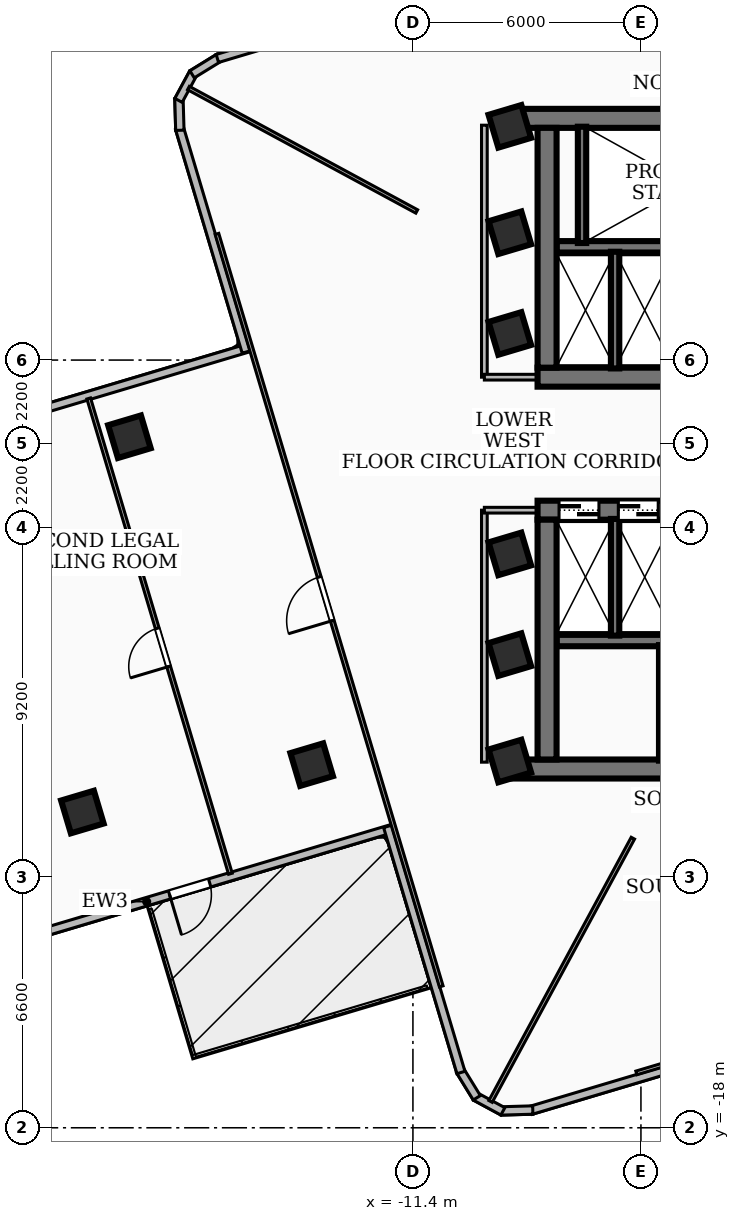
"""IFC4 building model, lengths in metres.
Left out: names, types, materials, properties, quantities, classifications, styles, units other than length and angle.
Written with IfcOpenShell. Run it as: python <this file> out.ifc"""

import sys

from ifc_helpers import new_model, si_unit, direction, frame, frame_2d, origin, origin_2d, place, context, subcontext, project, spatial, rectangle, extrude, element, fill, save


model = new_model("IFC4")
c1 = context("Model", 3, precision=1e-05, world=origin(), true_north=direction((0.0, 1.0)))
c2 = subcontext(c1, "Body", "Model", "MODEL_VIEW")
j1 = project(units=[si_unit("LENGTHUNIT", "METRE"), si_unit("PLANEANGLEUNIT", "RADIAN")], contexts=[c1])
p1 = place(None, origin())
s1 = spatial("IfcSite", under=j1, at=p1, CompositionType="ELEMENT")
p2 = place(p1, origin())
s2 = spatial("IfcBuilding", under=s1, at=p2, CompositionType="ELEMENT")
p3 = place(p2, frame((0.0, 0.0, 145.08)))
s3 = spatial("IfcBuildingStorey", under=s2, at=p3, CompositionType="ELEMENT", Elevation=145.08)
p4 = place(p3, frame((-8.78, 8.56, 0.0), z_axis=(0.0, 0.0, 1.0), x_axis=(1.0, 0.0, 0.0)))
e1 = element("IfcWall", 1, at=p4, inside=s3, PredefinedType="SHEAR", context=c2, shape_type="SweptSolid", body=[
    extrude(rectangle(XDim=17.56, YDim=0.5, at=frame_2d((8.78, 0.0))), origin(), (0.0, 0.0, 1.0), 3.32),
])
p5 = place(p3, frame((8.12, 1.75, 0.0), z_axis=(0.0, 0.0, 1.0), x_axis=(-1.0, 0.0, 0.0)))
e2 = element("IfcWall", 2, at=p5, inside=s3, PredefinedType="SHEAR", context=c2, shape_type="SweptSolid", body=[
    extrude(rectangle(XDim=16.24, YDim=0.5, at=frame_2d((8.12, 0.0))), origin(), (0.0, 0.0, 1.0), 3.32),
])
p6 = place(p5, frame((7.45, 0.0, 0.0)))
e3 = element("IfcOpeningElement", 3, at=p6, cuts=e2, PredefinedType="OPENING", context=c2, shape_type="SweptSolid", body=[
    extrude(rectangle(XDim=1.0, YDim=2.1, at=frame_2d((0.5, 1.05))), frame((0.0, 0.26, 0.0), z_axis=(0.0, -1.0, 0.0), x_axis=(1.0, 0.0, 0.0)), (0.0, 0.0, 1.0), 0.52),
])
p7 = place(p5, frame((3.85, 0.0, 0.0)))
e4 = element("IfcOpeningElement", 4, at=p7, cuts=e2, PredefinedType="OPENING", context=c2, shape_type="SweptSolid", body=[
    extrude(rectangle(XDim=0.9, YDim=2.06, at=frame_2d((0.45, 1.03))), frame((0.0, 0.26, 0.0), z_axis=(0.0, -1.0, 0.0), x_axis=(1.0, 0.0, 0.0)), (0.0, 0.0, 1.0), 0.52),
])
p8 = place(p5, frame((2.35, 0.0, 0.0)))
e5 = element("IfcOpeningElement", 5, at=p8, cuts=e2, PredefinedType="OPENING", context=c2, shape_type="SweptSolid", body=[
    extrude(rectangle(XDim=0.9, YDim=2.06, at=frame_2d((0.45, 1.03))), frame((0.0, 0.26, 0.0), z_axis=(0.0, -1.0, 0.0), x_axis=(1.0, 0.0, 0.0)), (0.0, 0.0, 1.0), 0.52),
])
p9 = place(p5, frame((0.8, 0.0, 0.0)))
e6 = element("IfcOpeningElement", 6, at=p9, cuts=e2, PredefinedType="OPENING", context=c2, shape_type="SweptSolid", body=[
    extrude(rectangle(XDim=0.9, YDim=2.06, at=frame_2d((0.45, 1.03))), frame((0.0, 0.26, 0.0), z_axis=(0.0, -1.0, 0.0), x_axis=(1.0, 0.0, 0.0)), (0.0, 0.0, 1.0), 0.52),
])
p10 = place(p3, frame((-7.87, 2.0, 0.0), z_axis=(0.0, 0.0, 1.0), x_axis=(0.0, 1.0, 0.0)))
e7 = element("IfcWall", 7, at=p10, inside=s3, PredefinedType="SHEAR", context=c2, shape_type="SweptSolid", body=[
    extrude(rectangle(XDim=6.31, YDim=0.5, at=frame_2d((3.155, 0.0))), origin(), (0.0, 0.0, 1.0), 3.32),
])
p11 = place(p3, frame((7.62, 5.18, 0.0), z_axis=(0.0, 0.0, 1.0), x_axis=(-1.0, 0.0, 0.0)))
e8 = element("IfcWall", 8, at=p11, inside=s3, PredefinedType="SOLIDWALL", context=c2, shape_type="SweptSolid", body=[
    extrude(rectangle(XDim=15.24, YDim=0.3, at=frame_2d((7.62, 0.0))), origin(), (0.0, 0.0, 1.0), 3.32),
])
p12 = place(p11, frame((5.77, 0.0, 0.0)))
e9 = element("IfcOpeningElement", 9, at=p12, cuts=e8, PredefinedType="OPENING", context=c2, shape_type="SweptSolid", body=[
    extrude(rectangle(XDim=1.1, YDim=2.15, at=frame_2d((0.55, 1.075))), frame((0.0, 0.16, 0.0), z_axis=(0.0, -1.0, 0.0), x_axis=(1.0, 0.0, 0.0)), (0.0, 0.0, 1.0), 0.32),
])
p13 = place(p11, frame((2.97, 0.0, 0.0)))
e10 = element("IfcOpeningElement", 10, at=p13, cuts=e8, PredefinedType="OPENING", context=c2, shape_type="SweptSolid", body=[
    extrude(rectangle(XDim=1.1, YDim=2.15, at=frame_2d((0.55, 1.075))), frame((0.0, 0.16, 0.0), z_axis=(0.0, -1.0, 0.0), x_axis=(1.0, 0.0, 0.0)), (0.0, 0.0, 1.0), 0.32),
])
p14 = place(p11, frame((7.97, 0.0, 0.0)))
e11 = element("IfcOpeningElement", 11, at=p14, cuts=e8, PredefinedType="OPENING", context=c2, shape_type="SweptSolid", body=[
    extrude(rectangle(XDim=1.0, YDim=2.1, at=frame_2d((0.5, 1.05))), frame((0.0, 0.16, 0.0), z_axis=(0.0, -1.0, 0.0), x_axis=(1.0, 0.0, 0.0)), (0.0, 0.0, 1.0), 0.32),
])
p15 = place(p3, frame((8.78, -8.56, 0.0), z_axis=(0.0, 0.0, 1.0), x_axis=(-1.0, 0.0, 0.0)))
e12 = element("IfcWall", 12, at=p15, inside=s3, PredefinedType="SHEAR", context=c2, shape_type="SweptSolid", body=[
    extrude(rectangle(XDim=17.56, YDim=0.5, at=frame_2d((8.78, 0.0))), origin(), (0.0, 0.0, 1.0), 3.32),
])
p16 = place(p3, frame((-8.12, -1.75, 0.0), z_axis=(0.0, 0.0, 1.0), x_axis=(1.0, 0.0, 0.0)))
e13 = element("IfcWall", 13, at=p16, inside=s3, PredefinedType="SHEAR", context=c2, shape_type="SweptSolid", body=[
    extrude(rectangle(XDim=16.24, YDim=0.5, at=frame_2d((8.12, 0.0))), origin(), (0.0, 0.0, 1.0), 3.32),
])
p17 = place(p16, frame((7.45, 0.0, 0.0)))
e14 = element("IfcOpeningElement", 14, at=p17, cuts=e13, PredefinedType="OPENING", context=c2, shape_type="SweptSolid", body=[
    extrude(rectangle(XDim=1.0, YDim=2.1, at=frame_2d((0.5, 1.05))), frame((0.0, 0.26, 0.0), z_axis=(0.0, -1.0, 0.0), x_axis=(1.0, 0.0, 0.0)), (0.0, 0.0, 1.0), 0.52),
])
p18 = place(p16, frame((12.65, 0.0, 0.0)))
e15 = element("IfcOpeningElement", 15, at=p18, cuts=e13, PredefinedType="OPENING", context=c2, shape_type="SweptSolid", body=[
    extrude(rectangle(XDim=0.9, YDim=2.06, at=frame_2d((0.45, 1.03))), frame((0.0, 0.26, 0.0), z_axis=(0.0, -1.0, 0.0), x_axis=(1.0, 0.0, 0.0)), (0.0, 0.0, 1.0), 0.52),
])
p19 = place(p16, frame((0.565, 0.0, 0.0)))
e16 = element("IfcOpeningElement", 16, at=p19, cuts=e13, PredefinedType="OPENING", context=c2, shape_type="SweptSolid", body=[
    extrude(rectangle(XDim=1.05, YDim=2.15, at=frame_2d((0.525, 1.075))), frame((0.0, 0.26, 0.0), z_axis=(0.0, -1.0, 0.0), x_axis=(1.0, 0.0, 0.0)), (0.0, 0.0, 1.0), 0.52),
])
p20 = place(p16, frame((2.125, 0.0, 0.0)))
e17 = element("IfcOpeningElement", 17, at=p20, cuts=e13, PredefinedType="OPENING", context=c2, shape_type="SweptSolid", body=[
    extrude(rectangle(XDim=1.05, YDim=2.15, at=frame_2d((0.525, 1.075))), frame((0.0, 0.26, 0.0), z_axis=(0.0, -1.0, 0.0), x_axis=(1.0, 0.0, 0.0)), (0.0, 0.0, 1.0), 0.52),
])
p21 = place(p16, frame((3.685, 0.0, 0.0)))
e18 = element("IfcOpeningElement", 18, at=p21, cuts=e13, PredefinedType="OPENING", context=c2, shape_type="SweptSolid", body=[
    extrude(rectangle(XDim=1.05, YDim=2.15, at=frame_2d((0.525, 1.075))), frame((0.0, 0.26, 0.0), z_axis=(0.0, -1.0, 0.0), x_axis=(1.0, 0.0, 0.0)), (0.0, 0.0, 1.0), 0.52),
])
p22 = place(p3, frame((-7.87, -8.31, 0.0), z_axis=(0.0, 0.0, 1.0), x_axis=(0.0, 1.0, 0.0)))
e19 = element("IfcWall", 19, at=p22, inside=s3, PredefinedType="SHEAR", context=c2, shape_type="SweptSolid", body=[
    extrude(rectangle(XDim=6.31, YDim=0.5, at=frame_2d((3.155, 0.0))), origin(), (0.0, 0.0, 1.0), 3.32),
])
p23 = place(p3, frame((-7.62, -5.18, 0.0), z_axis=(0.0, 0.0, 1.0), x_axis=(1.0, 0.0, 0.0)))
e20 = element("IfcWall", 20, at=p23, inside=s3, PredefinedType="SOLIDWALL", context=c2, shape_type="SweptSolid", body=[
    extrude(rectangle(XDim=15.24, YDim=0.3, at=frame_2d((7.62, 0.0))), origin(), (0.0, 0.0, 1.0), 3.32),
])
p24 = place(p23, frame((5.77, 0.0, 0.0)))
e21 = element("IfcOpeningElement", 21, at=p24, cuts=e20, PredefinedType="OPENING", context=c2, shape_type="SweptSolid", body=[
    extrude(rectangle(XDim=1.1, YDim=2.15, at=frame_2d((0.55, 1.075))), frame((0.0, 0.16, 0.0), z_axis=(0.0, -1.0, 0.0), x_axis=(1.0, 0.0, 0.0)), (0.0, 0.0, 1.0), 0.32),
])
p25 = place(p23, frame((7.97, 0.0, 0.0)))
e22 = element("IfcOpeningElement", 22, at=p25, cuts=e20, PredefinedType="OPENING", context=c2, shape_type="SweptSolid", body=[
    extrude(rectangle(XDim=1.0, YDim=2.1, at=frame_2d((0.5, 1.05))), frame((0.0, 0.16, 0.0), z_axis=(0.0, -1.0, 0.0), x_axis=(1.0, 0.0, 0.0)), (0.0, 0.0, 1.0), 0.32),
])
p26 = place(p3, frame((-6.95, 5.28, 0.0), z_axis=(0.0, 0.0, 1.0), x_axis=(0.0, 1.0, 0.0)))
e23 = element("IfcWall", 23, at=p26, inside=s3, PredefinedType="SOLIDWALL", context=c2, shape_type="SweptSolid", body=[
    extrude(rectangle(XDim=3.06, YDim=0.22, at=frame_2d((1.53, 0.0))), origin(), (0.0, 0.0, 1.0), 3.32),
])
p27 = place(p3, frame((-4.8, -8.34, 0.0), z_axis=(0.0, 0.0, 1.0), x_axis=(0.0, 1.0, 0.0)))
e24 = element("IfcWall", 24, at=p27, inside=s3, PredefinedType="SOLIDWALL", context=c2, shape_type="SweptSolid", body=[
    extrude(rectangle(XDim=3.04, YDim=0.25, at=frame_2d((1.52, 0.0))), origin(), (0.0, 0.0, 1.0), 3.32),
])
for number, where, z_axis, x_axis in (
    (25, (-6.08, 1.98, 0.0), (0.0, 0.0, 1.0), (0.0, 1.0, 0.0)),
    (26, (-6.08, -5.05, 0.0), (0.0, 0.0, 1.0), (0.0, 1.0, 0.0)),
):
    element("IfcWall", number, at=place(p3, frame(where, z_axis=z_axis, x_axis=x_axis)), inside=s3, PredefinedType="SOLIDWALL", context=c2, shape_type="SweptSolid", body=[
        extrude(rectangle(XDim=3.07, YDim=0.22, at=frame_2d((1.535, 0.0))), origin(), (0.0, 0.0, 1.0), 3.32),
    ])
for number, where, z_axis, x_axis in (
    (27, (-8.85, -5.55, 0.0), (0.0, 0.0, 1.0), (0.958, 0.286, 0.0)),
    (28, (-8.85, -2.9, 0.0), (0.0, 0.0, 1.0), (0.958, 0.286, 0.0)),
    (29, (-8.85, 2.9, 0.0), (0.0, 0.0, 1.0), (0.958, 0.286, 0.0)),
    (30, (-8.85, 5.55, 0.0), (0.0, 0.0, 1.0), (0.958, 0.286, 0.0)),
    (31, (-8.85, 8.35, 0.0), (0.0, 0.0, 1.0), (0.958, 0.286, 0.0)),
    (32, (-8.85, -8.35, 0.0), (0.0, 0.0, 1.0), (0.958, 0.286, 0.0)),
    (33, (-18.86, 0.183, 0.0), (0.0, 0.0, 1.0), (0.958, 0.286, 0.0)),
    (34, (-14.064, -8.445, 0.0), (0.0, 0.0, 1.0), (0.958, 0.286, 0.0)),
    (35, (-20.098, -9.692, 0.0), (0.0, 0.0, 1.0), (0.958, 0.286, 0.0)),
):
    element("IfcColumn", number, at=place(p3, frame(where, z_axis=z_axis, x_axis=x_axis)), inside=s3, PredefinedType="COLUMN", context=c2, shape_type="SweptSolid", body=[
        extrude(rectangle(XDim=0.9, YDim=0.9, at=origin_2d()), origin(), (0.0, 0.0, 1.0), 3.6),
    ])
p28 = place(p3, frame((-11.957, -10.129, 0.0), z_axis=(0.0, 0.0, 1.0), x_axis=(-0.958343962332, -0.285616613419, 0.0)))
e36 = element("IfcWall", 36, at=p28, inside=s3, PredefinedType="SOLIDWALL", context=c2, shape_type="SweptSolid", body=[
    extrude(rectangle(XDim=13.458, YDim=0.22, at=frame_2d((6.729, 0.0))), origin(), (0.0, 0.0, 1.0), 3.32),
])
p29 = place(p28, frame((5.0, 0.0, 0.0)))
e37 = element("IfcOpeningElement", 37, at=p29, cuts=e36, PredefinedType="OPENING", context=c2, shape_type="SweptSolid", body=[
    extrude(rectangle(XDim=1.1, YDim=2.1, at=frame_2d((0.55, 1.05))), frame((0.0, 0.12, 0.0), z_axis=(0.0, -1.0, 0.0), x_axis=(1.0, 0.0, 0.0)), (0.0, 0.0, 1.0), 0.24),
])
p30 = place(p3, frame((-28.626, -1.323, 0.0), z_axis=(0.0, 0.0, 1.0), x_axis=(0.958343962332, 0.285616613419, 0.0)))
e38 = element("IfcWall", 38, at=p30, inside=s3, PredefinedType="SOLIDWALL", context=c2, shape_type="SweptSolid", body=[
    extrude(rectangle(XDim=13.458, YDim=0.22, at=frame_2d((6.729, 0.0))), origin(), (0.0, 0.0, 1.0), 3.32),
])
p31 = place(p30, frame((0.85, 0.0, 0.85)))
e39 = element("IfcOpeningElement", 39, at=p31, cuts=e38, PredefinedType="OPENING", context=c2, shape_type="SweptSolid", body=[
    extrude(rectangle(XDim=2.4, YDim=1.85, at=frame_2d((1.2, 0.925))), frame((0.0, 0.12, 0.0), z_axis=(0.0, -1.0, 0.0), x_axis=(1.0, 0.0, 0.0)), (0.0, 0.0, 1.0), 0.24),
])
p32 = place(p3, frame((-15.787, 2.412, 0.0), z_axis=(0.0, 0.0, 1.0), x_axis=(-0.285712854037, 0.958315274342, 0.0)))
e40 = element("IfcWall", 40, at=p32, inside=s3, PredefinedType="SOLIDWALL", context=c2, shape_type="SweptSolid", body=[
    extrude(rectangle(XDim=6.139, YDim=0.22, at=frame_2d((3.069, 0.0))), origin(), (0.0, 0.0, 1.0), 3.32),
])
p33 = place(p3, frame((-17.533, 8.246, 0.0), z_axis=(0.0, 0.0, 1.0), x_axis=(-0.028676726094, 0.999588738122, 0.0)))
e41 = element("IfcWall", 41, at=p33, inside=s3, PredefinedType="SOLIDWALL", context=c2, shape_type="SweptSolid", body=[
    extrude(rectangle(XDim=0.834, YDim=0.22, at=frame_2d((0.417, 0.0))), origin(), (0.0, 0.0, 1.0), 3.32),
])
p34 = place(p3, frame((-17.568, 9.033, 0.0), z_axis=(0.0, 0.0, 1.0), x_axis=(0.475928115507, 0.879484183411, 0.0)))
e42 = element("IfcWall", 42, at=p34, inside=s3, PredefinedType="SOLIDWALL", context=c2, shape_type="SweptSolid", body=[
    extrude(rectangle(XDim=0.82, YDim=0.22, at=frame_2d((0.41, 0.0))), origin(), (0.0, 0.0, 1.0), 3.32),
])
p35 = place(p3, frame((-17.211, 9.719, 0.0), z_axis=(0.0, 0.0, 1.0), x_axis=(0.851597982144, 0.524195456684, 0.0)))
e43 = element("IfcWall", 43, at=p35, inside=s3, PredefinedType="SOLIDWALL", context=c2, shape_type="SweptSolid", body=[
    extrude(rectangle(XDim=0.834, YDim=0.22, at=frame_2d((0.417, 0.0))), origin(), (0.0, 0.0, 1.0), 3.32),
])
p36 = place(p3, frame((-16.546, 10.136, 0.0), z_axis=(0.0, 0.0, 1.0), x_axis=(0.958346765514, 0.285607207592, 0.0)))
e44 = element("IfcWall", 44, at=p36, inside=s3, PredefinedType="SOLIDWALL", context=c2, shape_type="SweptSolid", body=[
    extrude(rectangle(XDim=6.757, YDim=0.22, at=frame_2d((3.379, 0.0))), origin(), (0.0, 0.0, 1.0), 3.32),
])
p37 = place(p3, frame((-2.412, -15.787, 0.0), z_axis=(0.0, 0.0, 1.0), x_axis=(-0.958315274342, -0.285712854037, 0.0)))
e45 = element("IfcWall", 45, at=p37, inside=s3, PredefinedType="SOLIDWALL", context=c2, shape_type="SweptSolid", body=[
    extrude(rectangle(XDim=6.139, YDim=0.22, at=frame_2d((3.069, 0.0))), origin(), (0.0, 0.0, 1.0), 2.55),
])
p38 = place(p3, frame((-8.246, -17.533, 0.0), z_axis=(0.0, 0.0, 1.0), x_axis=(-0.999588738122, -0.028676726094, 0.0)))
e46 = element("IfcWall", 46, at=p38, inside=s3, PredefinedType="SOLIDWALL", context=c2, shape_type="SweptSolid", body=[
    extrude(rectangle(XDim=0.834, YDim=0.22, at=frame_2d((0.417, 0.0))), origin(), (0.0, 0.0, 1.0), 3.32),
])
p39 = place(p3, frame((-9.033, -17.568, 0.0), z_axis=(0.0, 0.0, 1.0), x_axis=(-0.879484183411, 0.475928115507, 0.0)))
e47 = element("IfcWall", 47, at=p39, inside=s3, PredefinedType="SOLIDWALL", context=c2, shape_type="SweptSolid", body=[
    extrude(rectangle(XDim=0.82, YDim=0.22, at=frame_2d((0.41, 0.0))), origin(), (0.0, 0.0, 1.0), 3.32),
])
p40 = place(p3, frame((-9.719, -17.211, 0.0), z_axis=(0.0, 0.0, 1.0), x_axis=(-0.524195456684, 0.851597982144, 0.0)))
e48 = element("IfcWall", 48, at=p40, inside=s3, PredefinedType="SOLIDWALL", context=c2, shape_type="SweptSolid", body=[
    extrude(rectangle(XDim=0.834, YDim=0.22, at=frame_2d((0.417, 0.0))), origin(), (0.0, 0.0, 1.0), 3.32),
])
p41 = place(p3, frame((-10.136, -16.546, 0.0), z_axis=(0.0, 0.0, 1.0), x_axis=(-0.285607207592, 0.958346765514, 0.0)))
e49 = element("IfcWall", 49, at=p41, inside=s3, PredefinedType="SOLIDWALL", context=c2, shape_type="SweptSolid", body=[
    extrude(rectangle(XDim=6.757, YDim=0.22, at=frame_2d((3.379, 0.0))), origin(), (0.0, 0.0, 1.0), 3.32),
])
p42 = place(p3, frame((-9.52, 1.75, 0.0), z_axis=(0.0, 0.0, 1.0), x_axis=(0.0, 1.0, 0.0)))
e50 = element("IfcWall", 50, at=p42, inside=s3, PredefinedType="PARTITIONING", context=c2, shape_type="SweptSolid", body=[
    extrude(rectangle(XDim=6.63, YDim=0.15, at=frame_2d((3.315, 0.0))), origin(), (0.0, 0.0, 1.0), 2.55),
])
p43 = place(p3, frame((-7.85, 1.75, 0.0), z_axis=(0.0, 0.0, 1.0), x_axis=(-1.0, 0.0, 0.0)))
e51 = element("IfcWall", 51, at=p43, inside=s3, PredefinedType="PARTITIONING", context=c2, shape_type="SweptSolid", body=[
    extrude(rectangle(XDim=1.67, YDim=0.15, at=frame_2d((0.835, 0.0))), origin(), (0.0, 0.0, 1.0), 2.55),
])
p44 = place(p3, frame((-9.52, -8.38, 0.0), z_axis=(0.0, 0.0, 1.0), x_axis=(0.0, 1.0, 0.0)))
e52 = element("IfcWall", 52, at=p44, inside=s3, PredefinedType="PARTITIONING", context=c2, shape_type="SweptSolid", body=[
    extrude(rectangle(XDim=6.63, YDim=0.15, at=frame_2d((3.315, 0.0))), origin(), (0.0, 0.0, 1.0), 2.55),
])
p45 = place(p3, frame((-7.85, -1.75, 0.0), z_axis=(0.0, 0.0, 1.0), x_axis=(-1.0, 0.0, 0.0)))
e53 = element("IfcWall", 53, at=p45, inside=s3, PredefinedType="PARTITIONING", context=c2, shape_type="SweptSolid", body=[
    extrude(rectangle(XDim=1.67, YDim=0.15, at=frame_2d((0.835, 0.0))), origin(), (0.0, 0.0, 1.0), 2.55),
])
p46 = place(p3, frame((-11.3, 6.11, 0.0), z_axis=(0.0, 0.0, 1.0), x_axis=(-0.879653556483, 0.475614991948, 0.0)))
e54 = element("IfcWall", 54, at=p46, inside=s3, PredefinedType="PARTITIONING", context=c2, shape_type="SweptSolid", body=[
    extrude(rectangle(XDim=6.829, YDim=0.1, at=frame_2d((3.414, 0.0))), origin(), (0.0, 0.0, 1.0), 3.32),
])
p47 = place(p3, frame((-5.612, -10.38, 0.0), z_axis=(0.0, 0.0, 1.0), x_axis=(-0.475666815962, -0.879625534073, 0.0)))
e55 = element("IfcWall", 55, at=p47, inside=s3, PredefinedType="PARTITIONING", context=c2, shape_type="SweptSolid", body=[
    extrude(rectangle(XDim=7.875, YDim=0.1, at=frame_2d((3.938, 0.0))), origin(), (0.0, 0.0, 1.0), 2.55),
])
p48 = place(p3, frame((-10.655, -14.279, 0.0), z_axis=(0.0, 0.0, 1.0), x_axis=(-0.285665949025, 0.958329257389, 0.0)))
e56 = element("IfcWall", 56, at=p48, inside=s3, PredefinedType="PARTITIONING", context=c2, shape_type="SweptSolid", body=[
    extrude(rectangle(XDim=20.66, YDim=0.1, at=frame_2d((10.33, 0.0))), origin(), (0.0, 0.0, 1.0), 2.55),
])
p49 = place(p48, frame((10.04, 0.0, 0.0)))
e57 = element("IfcOpeningElement", 57, at=p49, cuts=e56, PredefinedType="OPENING", context=c2, shape_type="SweptSolid", body=[
    extrude(rectangle(XDim=1.2, YDim=2.1, at=frame_2d((0.6, 1.05))), frame((0.0, 0.06, 0.0), z_axis=(0.0, -1.0, 0.0), x_axis=(1.0, 0.0, 0.0)), (0.0, 0.0, 1.0), 0.12),
])
p50 = place(p3, frame((-16.203, -11.316, 0.0), z_axis=(0.0, 0.0, 1.0), x_axis=(-0.285679130118, 0.958325328171, 0.0)))
e58 = element("IfcWall", 58, at=p50, inside=s3, PredefinedType="PARTITIONING", context=c2, shape_type="SweptSolid", body=[
    extrude(rectangle(XDim=13.05, YDim=0.1, at=frame_2d((6.525, 0.0))), origin(), (0.0, 0.0, 1.0), 2.55),
])
p51 = place(p50, frame((5.689, 0.0, 0.0)))
e59 = element("IfcOpeningElement", 59, at=p51, cuts=e58, PredefinedType="OPENING", context=c2, shape_type="SweptSolid", body=[
    extrude(rectangle(XDim=1.05, YDim=2.08, at=frame_2d((0.525, 1.04))), frame((0.0, 0.06, 0.0), z_axis=(0.0, -1.0, 0.0), x_axis=(1.0, 0.0, 0.0)), (0.0, 0.0, 1.0), 0.12),
])
p52 = place(p3, frame((14.279, -10.655, 0.0), z_axis=(0.0, 0.0, 1.0), x_axis=(-0.958329257389, -0.285665949025, 0.0)))
e60 = element("IfcWall", 60, at=p52, inside=s3, PredefinedType="PARTITIONING", context=c2, shape_type="SweptSolid", body=[
    extrude(rectangle(XDim=20.66, YDim=0.1, at=frame_2d((10.33, 0.0))), origin(), (0.0, 0.0, 1.0), 2.55),
])
p53 = place(p52, frame((10.04, 0.0, 0.0)))
e61 = element("IfcOpeningElement", 61, at=p53, cuts=e60, PredefinedType="OPENING", context=c2, shape_type="SweptSolid", body=[
    extrude(rectangle(XDim=1.2, YDim=2.1, at=frame_2d((0.6, 1.05))), frame((0.0, 0.06, 0.0), z_axis=(0.0, -1.0, 0.0), x_axis=(1.0, 0.0, 0.0)), (0.0, 0.0, 1.0), 0.12),
])
p54 = place(p29, origin())
e62 = element("IfcDoor", 62, at=p54, inside=s3, OperationType="SINGLE_SWING_RIGHT", PredefinedType="DOOR", context=c2, shape_type="SweptSolid", body=[
    extrude(rectangle(XDim=1.1, YDim=2.1, at=frame_2d((0.55, 1.05))), frame((0.0, 0.025, 0.0), z_axis=(0.0, -1.0, 0.0), x_axis=(1.0, 0.0, 0.0)), (0.0, 0.0, 1.0), 0.05),
])
fill(e37, e62)
p55 = place(p19, origin())
e63 = element("IfcDoor", 63, at=p55, inside=s3, OperationType="DOUBLE_DOOR_SLIDING", PredefinedType="DOOR", context=c2, shape_type="SweptSolid", body=[
    extrude(rectangle(XDim=1.05, YDim=2.15, at=frame_2d((0.525, 1.075))), frame((0.0, 0.025, 0.0), z_axis=(0.0, -1.0, 0.0), x_axis=(1.0, 0.0, 0.0)), (0.0, 0.0, 1.0), 0.05),
])
fill(e16, e63)
p56 = place(p20, origin())
e64 = element("IfcDoor", 64, at=p56, inside=s3, OperationType="DOUBLE_DOOR_SLIDING", PredefinedType="DOOR", context=c2, shape_type="SweptSolid", body=[
    extrude(rectangle(XDim=1.05, YDim=2.15, at=frame_2d((0.525, 1.075))), frame((0.0, 0.025, 0.0), z_axis=(0.0, -1.0, 0.0), x_axis=(1.0, 0.0, 0.0)), (0.0, 0.0, 1.0), 0.05),
])
fill(e17, e64)
p57 = place(p49, origin())
e65 = element("IfcDoor", 65, at=p57, inside=s3, OperationType="SINGLE_SWING_LEFT", PredefinedType="DOOR", context=c2, shape_type="SweptSolid", body=[
    extrude(rectangle(XDim=1.2, YDim=2.1, at=frame_2d((0.6, 1.05))), frame((0.0, 0.025, 0.0), z_axis=(0.0, -1.0, 0.0), x_axis=(1.0, 0.0, 0.0)), (0.0, 0.0, 1.0), 0.05),
])
fill(e57, e65)
p58 = place(p51, origin())
e66 = element("IfcDoor", 66, at=p58, inside=s3, OperationType="SINGLE_SWING_LEFT", PredefinedType="DOOR", context=c2, shape_type="SweptSolid", body=[
    extrude(rectangle(XDim=1.05, YDim=2.08, at=frame_2d((0.525, 1.04))), frame((0.0, 0.025, 0.0), z_axis=(0.0, -1.0, 0.0), x_axis=(1.0, 0.0, 0.0)), (0.0, 0.0, 1.0), 0.05),
])
fill(e59, e66)
save(model, sys.argv[1])
